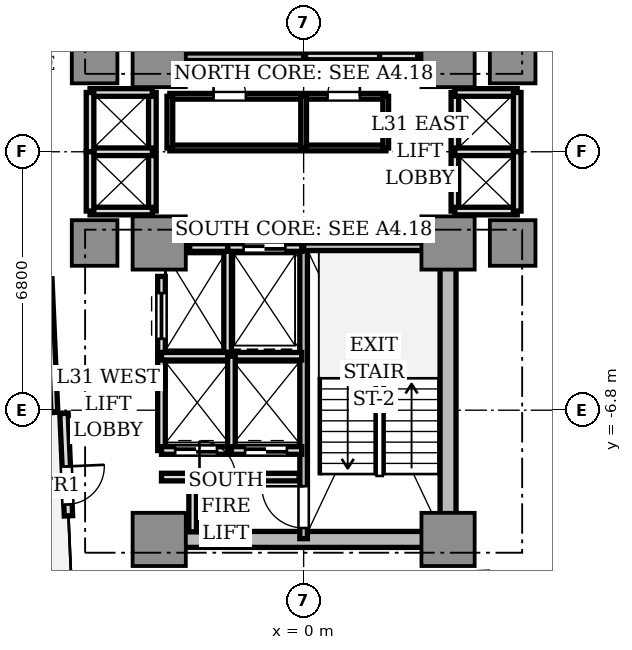
"""IFC4 building model, lengths in metres.
Left out: names, types, materials, properties, quantities, classifications, styles, units other than length and angle.
Written with IfcOpenShell. Run it as: python <this file> out.ifc"""

import sys

from ifc_helpers import new_model, si_unit, direction, frame, frame_2d, origin, origin_2d, place, context, subcontext, project, spatial, rectangle, extrude, source, transform, mapped, element, fill, save


model = new_model("IFC4")
c1 = context("Model", 3, precision=1e-05, world=origin(), true_north=direction((0.0, 1.0)))
c2 = subcontext(c1, "Body", "Model", "MODEL_VIEW")
j1 = project(units=[si_unit("LENGTHUNIT", "METRE"), si_unit("PLANEANGLEUNIT", "RADIAN")], contexts=[c1])
p1 = place(None, origin())
s1 = spatial("IfcSite", under=j1, at=p1, CompositionType="ELEMENT")
p2 = place(p1, origin())
s2 = spatial("IfcBuilding", under=s1, at=p2, CompositionType="ELEMENT")
p3 = place(p2, frame((0.0, 0.0, 114.8)))
s3 = spatial("IfcBuildingStorey", under=s2, at=p3, CompositionType="ELEMENT", Elevation=114.8)
p4 = place(p3, frame((-3.55, -10.2, 0.0), z_axis=(0.0, 0.0, 1.0), x_axis=(1.0, 0.0, 0.0)))
e1 = element("IfcWall", 1, at=p4, inside=s3, PredefinedType="SHEAR", context=c2, shape_type="SweptSolid", body=[
    extrude(rectangle(XDim=7.1, YDim=0.42, at=frame_2d((3.55, 0.0))), origin(), (0.0, 0.0, 1.0), 3.11),
])
p5 = place(p3, frame((3.8, -9.75, 0.0), z_axis=(0.0, 0.0, 1.0), x_axis=(0.0, 1.0, 0.0)))
e2 = element("IfcWall", 2, at=p5, inside=s3, PredefinedType="SHEAR", context=c2, shape_type="SweptSolid", body=[
    extrude(rectangle(XDim=6.9, YDim=0.42, at=frame_2d((3.45, 0.0))), origin(), (0.0, 0.0, 1.0), 3.11),
])
m1 = source(origin(), c2, "Body", "SweptSolid", [
    extrude(rectangle(XDim=1.4, YDim=1.4, at=origin_2d()), origin(), (0.0, 0.0, 1.0), 3.11),
])
for number, where, z_axis, x_axis in (
    (3, (-3.8, 2.4, 0.0), (0.0, 0.0, 1.0), (1.0, 0.0, 0.0)),
    (4, (3.8, 2.4, 0.0), (0.0, 0.0, 1.0), (1.0, 0.0, 0.0)),
    (5, (-3.8, -2.4, 0.0), (0.0, 0.0, 1.0), (1.0, 0.0, 0.0)),
    (6, (3.8, -2.4, 0.0), (0.0, 0.0, 1.0), (1.0, 0.0, 0.0)),
    (7, (-3.8, -10.2, 0.0), (0.0, 0.0, 1.0), (1.0, 0.0, 0.0)),
    (8, (3.8, -10.2, 0.0), (0.0, 0.0, 1.0), (1.0, 0.0, 0.0)),
):
    element("IfcColumn", number, at=place(p3, frame(where, z_axis=z_axis, x_axis=x_axis)), inside=s3, PredefinedType="COLUMN", context=c2, shape_type="MappedRepresentation", body=[
        mapped(m1, transform((0.0, 0.0, 0.0), scale=1.0)),
    ])
m2 = source(origin(), c2, "Body", "SweptSolid", [
    extrude(rectangle(XDim=1.2, YDim=1.2, at=origin_2d()), origin(), (0.0, 0.0, 1.0), 3.11),
])
for number, where, z_axis, x_axis in (
    (9, (5.5, 2.4, 0.0), (0.0, 0.0, 1.0), (1.0, 0.0, 0.0)),
    (10, (-5.5, 2.4, 0.0), (0.0, 0.0, 1.0), (1.0, 0.0, 0.0)),
    (11, (5.5, -2.4, 0.0), (0.0, 0.0, 1.0), (1.0, 0.0, 0.0)),
    (12, (-5.5, -2.4, 0.0), (0.0, 0.0, 1.0), (1.0, 0.0, 0.0)),
):
    element("IfcColumn", number, at=place(p3, frame(where, z_axis=z_axis, x_axis=x_axis)), inside=s3, PredefinedType="COLUMN", context=c2, shape_type="MappedRepresentation", body=[
        mapped(m2, transform((0.0, 0.0, 0.0), scale=1.0)),
    ])
p6 = place(p3, frame((-6.306, -6.882, 0.0), z_axis=(0.0, 0.0, 1.0), x_axis=(0.043672655174, -0.999045894436, 0.0)))
e13 = element("IfcWall", 13, at=p6, inside=s3, PredefinedType="STANDARD", context=c2, shape_type="SweptSolid", body=[
    extrude(rectangle(XDim=2.7, YDim=0.22, at=frame_2d((1.35, 0.0))), origin(), (0.0, 0.0, 1.0), 3.11),
])
p7 = place(p6, frame((1.4, 0.0, 0.0)))
e14 = element("IfcOpeningElement", 14, at=p7, cuts=e13, PredefinedType="OPENING", context=c2, shape_type="SweptSolid", body=[
    extrude(rectangle(XDim=1.0, YDim=2.2, at=frame_2d((0.5, 1.1))), frame((0.0, 0.12, 0.0), z_axis=(0.0, -1.0, 0.0), x_axis=(1.0, 0.0, 0.0)), (0.0, 0.0, 1.0), 0.24),
])
p8 = place(p3, frame((0.0, 2.5, 0.0), z_axis=(0.0, 0.0, 1.0), x_axis=(0.0, 1.0, 0.0)))
e15 = element("IfcWall", 15, at=p8, inside=s3, PredefinedType="SOLIDWALL", context=c2, shape_type="SweptSolid", body=[
    extrude(rectangle(XDim=7.68, YDim=0.2, at=frame_2d((3.84, 0.0))), origin(), (0.0, 0.0, 1.0), 3.11),
])
p9 = place(p8, frame((6.36, 0.0, 0.0)))
e16 = element("IfcOpeningElement", 16, at=p9, cuts=e15, PredefinedType="OPENING", context=c2, shape_type="SweptSolid", body=[
    extrude(rectangle(XDim=1.1, YDim=2.15, at=frame_2d((0.55, 1.075))), frame((0.0, 0.11, 0.0), z_axis=(0.0, -1.0, 0.0), x_axis=(1.0, 0.0, 0.0)), (0.0, 0.0, 1.0), 0.22),
])
p10 = place(p3, frame((-3.72, 2.5, 0.0), z_axis=(0.0, 0.0, 1.0), x_axis=(1.0, 0.0, 0.0)))
e17 = element("IfcWall", 17, at=p10, inside=s3, PredefinedType="SOLIDWALL", context=c2, shape_type="SweptSolid", body=[
    extrude(rectangle(XDim=3.72, YDim=0.2, at=frame_2d((1.86, 0.0))), origin(), (0.0, 0.0, 1.0), 3.11),
])
p11 = place(p3, frame((0.0, -10.18, 0.0), z_axis=(0.0, 0.0, 1.0), x_axis=(0.0, 1.0, 0.0)))
e18 = element("IfcWall", 18, at=p11, inside=s3, PredefinedType="SOLIDWALL", context=c2, shape_type="SweptSolid", body=[
    extrude(rectangle(XDim=7.68, YDim=0.2, at=frame_2d((3.84, 0.0))), origin(), (0.0, 0.0, 1.0), 3.11),
])
p12 = place(p11, frame((0.28, 0.0, 0.0)))
e19 = element("IfcOpeningElement", 19, at=p12, cuts=e18, PredefinedType="OPENING", context=c2, shape_type="SweptSolid", body=[
    extrude(rectangle(XDim=1.1, YDim=2.15, at=frame_2d((0.55, 1.075))), frame((0.0, 0.11, 0.0), z_axis=(0.0, -1.0, 0.0), x_axis=(1.0, 0.0, 0.0)), (0.0, 0.0, 1.0), 0.22),
])
p13 = place(p3, frame((0.0, -2.5, 0.0), z_axis=(0.0, 0.0, 1.0), x_axis=(1.0, 0.0, 0.0)))
e20 = element("IfcWall", 20, at=p13, inside=s3, PredefinedType="SOLIDWALL", context=c2, shape_type="SweptSolid", body=[
    extrude(rectangle(XDim=3.72, YDim=0.2, at=frame_2d((1.86, 0.0))), origin(), (0.0, 0.0, 1.0), 3.11),
])
p14 = place(p3, frame((2.0, 2.5, 0.0), z_axis=(0.0, 0.0, 1.0), x_axis=(0.0, 1.0, 0.0)))
e21 = element("IfcWall", 21, at=p14, inside=s3, PredefinedType="SOLIDWALL", context=c2, shape_type="SweptSolid", body=[
    extrude(rectangle(XDim=2.78, YDim=0.2, at=frame_2d((1.39, 0.0))), origin(), (0.0, 0.0, 1.0), 2.66),
])
p15 = place(p3, frame((0.05, 2.52, 0.0), z_axis=(0.0, 0.0, 1.0), x_axis=(1.0, 0.0, 0.0)))
e22 = element("IfcWall", 22, at=p15, inside=s3, PredefinedType="SOLIDWALL", context=c2, shape_type="SweptSolid", body=[
    extrude(rectangle(XDim=1.95, YDim=0.2, at=frame_2d((0.975, 0.0))), origin(), (0.0, 0.0, 1.0), 2.66),
])
p16 = place(p3, frame((-2.0, -5.28, 0.0), z_axis=(0.0, 0.0, 1.0), x_axis=(0.0, 1.0, 0.0)))
e23 = element("IfcWall", 23, at=p16, inside=s3, PredefinedType="SOLIDWALL", context=c2, shape_type="SweptSolid", body=[
    extrude(rectangle(XDim=2.78, YDim=0.2, at=frame_2d((1.39, 0.0))), origin(), (0.0, 0.0, 1.0), 2.66),
])
p17 = place(p3, frame((-2.0, -2.52, 0.0), z_axis=(0.0, 0.0, 1.0), x_axis=(1.0, 0.0, 0.0)))
e24 = element("IfcWall", 24, at=p17, inside=s3, PredefinedType="SOLIDWALL", context=c2, shape_type="SweptSolid", body=[
    extrude(rectangle(XDim=1.95, YDim=0.2, at=frame_2d((0.975, 0.0))), origin(), (0.0, 0.0, 1.0), 2.66),
])
p18 = place(p17, frame((0.42, 0.0, 0.0)))
e25 = element("IfcOpeningElement", 25, at=p18, cuts=e24, PredefinedType="OPENING", context=c2, shape_type="SweptSolid", body=[
    extrude(rectangle(XDim=1.1, YDim=2.2, at=frame_2d((0.55, 1.1))), frame((0.0, 0.11, 0.0), z_axis=(0.0, -1.0, 0.0), x_axis=(1.0, 0.0, 0.0)), (0.0, 0.0, 1.0), 0.22),
])
for number, where, z_axis, x_axis in (
    (26, (2.0, 2.52, 0.0), (0.0, 0.0, 1.0), (1.0, 0.0, 0.0)),
    (27, (-3.0, -2.52, 0.0), (0.0, 0.0, 1.0), (1.0, 0.0, 0.0)),
):
    element("IfcWall", number, at=place(p3, frame(where, z_axis=z_axis, x_axis=x_axis)), inside=s3, PredefinedType="SOLIDWALL", context=c2, shape_type="SweptSolid", body=[
        extrude(rectangle(XDim=1.0, YDim=0.2, at=frame_2d((0.5, 0.0))), origin(), (0.0, 0.0, 1.0), 2.66),
    ])
p19 = place(p3, frame((-3.74, -5.36, 0.0), z_axis=(0.0, 0.0, 1.0), x_axis=(0.0, 1.0, 0.0)))
e28 = element("IfcWall", 28, at=p19, inside=s3, PredefinedType="SOLIDWALL", context=c2, shape_type="SweptSolid", body=[
    extrude(rectangle(XDim=2.08, YDim=0.2, at=frame_2d((1.04, 0.0))), origin(), (0.0, 0.0, 1.0), 2.66),
])
p20 = place(p19, frame((0.44, 0.0, 0.0)))
e29 = element("IfcOpeningElement", 29, at=p20, cuts=e28, PredefinedType="OPENING", context=c2, shape_type="SweptSolid", body=[
    extrude(rectangle(XDim=1.2, YDim=2.2, at=frame_2d((0.6, 1.1))), frame((0.0, 0.11, 0.0), z_axis=(0.0, -1.0, 0.0), x_axis=(1.0, 0.0, 0.0)), (0.0, 0.0, 1.0), 0.22),
])
p21 = place(p3, frame((-3.74, -7.86, 0.0), z_axis=(0.0, 0.0, 1.0), x_axis=(0.0, 1.0, 0.0)))
e30 = element("IfcWall", 30, at=p21, inside=s3, PredefinedType="SOLIDWALL", context=c2, shape_type="SweptSolid", body=[
    extrude(rectangle(XDim=2.48, YDim=0.2, at=frame_2d((1.24, 0.0))), origin(), (0.0, 0.0, 1.0), 2.66),
])
p22 = place(p3, frame((-3.74, -7.86, 0.0), z_axis=(0.0, 0.0, 1.0), x_axis=(1.0, 0.0, 0.0)))
e31 = element("IfcWall", 31, at=p22, inside=s3, PredefinedType="SOLIDWALL", context=c2, shape_type="SweptSolid", body=[
    extrude(rectangle(XDim=1.84, YDim=0.2, at=frame_2d((0.92, 0.0))), origin(), (0.0, 0.0, 1.0), 2.66),
])
p23 = place(p22, frame((0.36, 0.0, 0.0)))
e32 = element("IfcOpeningElement", 32, at=p23, cuts=e31, PredefinedType="OPENING", context=c2, shape_type="SweptSolid", body=[
    extrude(rectangle(XDim=1.1, YDim=2.2, at=frame_2d((0.55, 1.1))), frame((0.0, 0.11, 0.0), z_axis=(0.0, -1.0, 0.0), x_axis=(1.0, 0.0, 0.0)), (0.0, 0.0, 1.0), 0.22),
])
p24 = place(p3, frame((-3.74, -5.38, 0.0), z_axis=(0.0, 0.0, 1.0), x_axis=(1.0, 0.0, 0.0)))
e33 = element("IfcWall", 33, at=p24, inside=s3, PredefinedType="SOLIDWALL", context=c2, shape_type="SweptSolid", body=[
    extrude(rectangle(XDim=3.69, YDim=0.2, at=frame_2d((1.845, 0.0))), origin(), (0.0, 0.0, 1.0), 2.66),
])
p25 = place(p3, frame((-1.9, -7.86, 0.0), z_axis=(0.0, 0.0, 1.0), x_axis=(0.0, 1.0, 0.0)))
e34 = element("IfcWall", 34, at=p25, inside=s3, PredefinedType="SOLIDWALL", context=c2, shape_type="SweptSolid", body=[
    extrude(rectangle(XDim=2.48, YDim=0.2, at=frame_2d((1.24, 0.0))), origin(), (0.0, 0.0, 1.0), 2.66),
])
p26 = place(p3, frame((-1.9, -7.86, 0.0), z_axis=(0.0, 0.0, 1.0), x_axis=(1.0, 0.0, 0.0)))
e35 = element("IfcWall", 35, at=p26, inside=s3, PredefinedType="SOLIDWALL", context=c2, shape_type="SweptSolid", body=[
    extrude(rectangle(XDim=1.85, YDim=0.2, at=frame_2d((0.925, 0.0))), origin(), (0.0, 0.0, 1.0), 2.66),
])
p27 = place(p26, frame((0.36, 0.0, 0.0)))
e36 = element("IfcOpeningElement", 36, at=p27, cuts=e35, PredefinedType="OPENING", context=c2, shape_type="SweptSolid", body=[
    extrude(rectangle(XDim=1.1, YDim=2.2, at=frame_2d((0.55, 1.1))), frame((0.0, 0.11, 0.0), z_axis=(0.0, -1.0, 0.0), x_axis=(1.0, 0.0, 0.0)), (0.0, 0.0, 1.0), 0.22),
])
p28 = place(p3, frame((3.98, -1.56, 0.0), z_axis=(0.0, 0.0, 1.0), x_axis=(0.0, 1.0, 0.0)))
e37 = element("IfcWall", 37, at=p28, inside=s3, PredefinedType="SOLIDWALL", context=c2, shape_type="SweptSolid", body=[
    extrude(rectangle(XDim=3.12, YDim=0.2, at=frame_2d((1.56, 0.0))), origin(), (0.0, 0.0, 1.0), 2.28),
])
for number, where, z_axis, x_axis in (
    (38, (3.98, 1.56, 0.0), (0.0, 0.0, 1.0), (1.0, 0.0, 0.0)),
    (39, (3.98, -1.56, 0.0), (0.0, 0.0, 1.0), (1.0, 0.0, 0.0)),
    (40, (3.98, 0.0, 0.0), (0.0, 0.0, 1.0), (1.0, 0.0, 0.0)),
):
    element("IfcWall", number, at=place(p3, frame(where, z_axis=z_axis, x_axis=x_axis)), inside=s3, PredefinedType="SOLIDWALL", context=c2, shape_type="SweptSolid", body=[
        extrude(rectangle(XDim=1.64, YDim=0.2, at=frame_2d((0.82, 0.0))), origin(), (0.0, 0.0, 1.0), 2.66),
    ])
for number, where, z_axis, x_axis in (
    (41, (5.62, 0.0, 0.0), (0.0, 0.0, 1.0), (0.0, 1.0, 0.0)),
    (42, (5.62, -1.56, 0.0), (0.0, 0.0, 1.0), (0.0, 1.0, 0.0)),
):
    element("IfcWall", number, at=place(p3, frame(where, z_axis=z_axis, x_axis=x_axis)), inside=s3, PredefinedType="SOLIDWALL", context=c2, shape_type="SweptSolid", body=[
        extrude(rectangle(XDim=1.56, YDim=0.2, at=frame_2d((0.78, 0.0))), origin(), (0.0, 0.0, 1.0), 2.66),
    ])
p29 = place(p3, frame((-3.98, -1.56, 0.0), z_axis=(0.0, 0.0, 1.0), x_axis=(0.0, 1.0, 0.0)))
e43 = element("IfcWall", 43, at=p29, inside=s3, PredefinedType="SOLIDWALL", context=c2, shape_type="SweptSolid", body=[
    extrude(rectangle(XDim=3.12, YDim=0.2, at=frame_2d((1.56, 0.0))), origin(), (0.0, 0.0, 1.0), 2.28),
])
for number, where, z_axis, x_axis in (
    (44, (-5.62, 1.56, 0.0), (0.0, 0.0, 1.0), (1.0, 0.0, 0.0)),
    (45, (-5.62, -1.56, 0.0), (0.0, 0.0, 1.0), (1.0, 0.0, 0.0)),
    (46, (-5.62, 0.0, 0.0), (0.0, 0.0, 1.0), (1.0, 0.0, 0.0)),
):
    element("IfcWall", number, at=place(p3, frame(where, z_axis=z_axis, x_axis=x_axis)), inside=s3, PredefinedType="SOLIDWALL", context=c2, shape_type="SweptSolid", body=[
        extrude(rectangle(XDim=1.64, YDim=0.2, at=frame_2d((0.82, 0.0))), origin(), (0.0, 0.0, 1.0), 2.66),
    ])
for number, where, z_axis, x_axis in (
    (47, (-5.62, 0.0, 0.0), (0.0, 0.0, 1.0), (0.0, 1.0, 0.0)),
    (48, (-5.62, -1.56, 0.0), (0.0, 0.0, 1.0), (0.0, 1.0, 0.0)),
):
    element("IfcWall", number, at=place(p3, frame(where, z_axis=z_axis, x_axis=x_axis)), inside=s3, PredefinedType="SOLIDWALL", context=c2, shape_type="SweptSolid", body=[
        extrude(rectangle(XDim=1.56, YDim=0.2, at=frame_2d((0.78, 0.0))), origin(), (0.0, 0.0, 1.0), 2.66),
    ])
p30 = place(p3, frame((-3.74, -8.56, 0.0), z_axis=(0.0, 0.0, 1.0), x_axis=(1.0, 0.0, 0.0)))
e49 = element("IfcWall", 49, at=p30, inside=s3, PredefinedType="SOLIDWALL", context=c2, shape_type="SweptSolid", body=[
    extrude(rectangle(XDim=3.62, YDim=0.2, at=frame_2d((1.81, 0.0))), origin(), (0.0, 0.0, 1.0), 2.66),
])
p31 = place(p30, frame((1.0, 0.0, 0.0)))
e50 = element("IfcOpeningElement", 50, at=p31, cuts=e49, PredefinedType="OPENING", context=c2, shape_type="SweptSolid", body=[
    extrude(rectangle(XDim=0.95, YDim=2.15, at=frame_2d((0.475, 1.075))), frame((0.0, 0.11, 0.0), z_axis=(0.0, -1.0, 0.0), x_axis=(1.0, 0.0, 0.0)), (0.0, 0.0, 1.0), 0.22),
])
p32 = place(p3, frame((-2.92, -10.0, 0.0), z_axis=(0.0, 0.0, 1.0), x_axis=(0.0, 1.0, 0.0)))
e51 = element("IfcWall", 51, at=p32, inside=s3, PredefinedType="SOLIDWALL", context=c2, shape_type="SweptSolid", body=[
    extrude(rectangle(XDim=1.44, YDim=0.2, at=frame_2d((0.72, 0.0))), origin(), (0.0, 0.0, 1.0), 2.66),
])
p33 = place(p3, frame((-3.52, 0.1, 0.0), z_axis=(0.0, 0.0, 1.0), x_axis=(1.0, 0.0, 0.0)))
e52 = element("IfcWall", 52, at=p33, inside=s3, PredefinedType="PARTITIONING", context=c2, shape_type="SweptSolid", body=[
    extrude(rectangle(XDim=5.68, YDim=0.15, at=frame_2d((2.84, 0.0))), origin(), (0.0, 0.0, 1.0), 2.66),
])
p34 = place(p3, frame((-3.52, 1.46, 0.0), z_axis=(0.0, 0.0, 1.0), x_axis=(1.0, 0.0, 0.0)))
e53 = element("IfcWall", 53, at=p34, inside=s3, PredefinedType="PARTITIONING", context=c2, shape_type="SweptSolid", body=[
    extrude(rectangle(XDim=5.68, YDim=0.15, at=frame_2d((2.84, 0.0))), origin(), (0.0, 0.0, 1.0), 2.66),
])
p35 = place(p34, frame((1.15, 0.0, 0.0)))
e54 = element("IfcOpeningElement", 54, at=p35, cuts=e53, PredefinedType="OPENING", context=c2, shape_type="SweptSolid", body=[
    extrude(rectangle(XDim=0.85, YDim=2.1, at=frame_2d((0.425, 1.05))), frame((0.0, 0.085, 0.0), z_axis=(0.0, -1.0, 0.0), x_axis=(1.0, 0.0, 0.0)), (0.0, 0.0, 1.0), 0.17),
])
p36 = place(p34, frame((4.15, 0.0, 0.0)))
e55 = element("IfcOpeningElement", 55, at=p36, cuts=e53, PredefinedType="OPENING", context=c2, shape_type="SweptSolid", body=[
    extrude(rectangle(XDim=0.85, YDim=2.1, at=frame_2d((0.425, 1.05))), frame((0.0, 0.085, 0.0), z_axis=(0.0, -1.0, 0.0), x_axis=(1.0, 0.0, 0.0)), (0.0, 0.0, 1.0), 0.17),
])
p37 = place(p3, frame((-3.52, 0.1, 0.0), z_axis=(0.0, 0.0, 1.0), x_axis=(0.0, 1.0, 0.0)))
e56 = element("IfcWall", 56, at=p37, inside=s3, PredefinedType="PARTITIONING", context=c2, shape_type="SweptSolid", body=[
    extrude(rectangle(XDim=1.36, YDim=0.15, at=frame_2d((0.68, 0.0))), origin(), (0.0, 0.0, 1.0), 2.28),
])
for number, where, z_axis, x_axis in (
    (57, (2.16, 0.1, 0.0), (0.0, 0.0, 1.0), (0.0, 1.0, 0.0)),
    (58, (0.0, 0.1, 0.0), (0.0, 0.0, 1.0), (0.0, 1.0, 0.0)),
):
    element("IfcWall", number, at=place(p3, frame(where, z_axis=z_axis, x_axis=x_axis)), inside=s3, PredefinedType="PARTITIONING", context=c2, shape_type="SweptSolid", body=[
        extrude(rectangle(XDim=1.36, YDim=0.15, at=frame_2d((0.68, 0.0))), origin(), (0.0, 0.0, 1.0), 2.66),
    ])
p38 = place(p3, frame((-6.71, -3.346, 0.0), z_axis=(0.0, 0.0, 1.0), x_axis=(0.043597663116, -0.999049169846, 0.0)))
e59 = element("IfcWall", 59, at=p38, inside=s3, PredefinedType="PARTITIONING", context=c2, shape_type="SweptSolid", body=[
    extrude(rectangle(XDim=3.5, YDim=0.18, at=frame_2d((1.75, 0.0))), origin(), (0.0, 0.0, 1.0), 2.66),
])
m3 = source(origin(), c2, "Body", "SweptSolid", [
    extrude(rectangle(XDim=1.0, YDim=0.05, at=origin_2d()), origin(), (0.0, 0.0, 1.0), 2.2),
])
p39 = place(p7, frame((0.5, 0.0, 0.0)))
e60 = element("IfcDoor", 60, at=p39, inside=s3, OperationType="SINGLE_SWING_LEFT", PredefinedType="DOOR", context=c2, shape_type="MappedRepresentation", body=[
    mapped(m3, transform((0.0, 0.0, 0.0), scale=1.0)),
])
fill(e14, e60)
m4 = source(origin(), c2, "Body", "SweptSolid", [
    extrude(rectangle(XDim=1.1, YDim=0.05, at=origin_2d()), origin(), (0.0, 0.0, 1.0), 2.2),
])
p40 = place(p18, frame((0.55, 0.0, 0.0)))
e61 = element("IfcDoor", 61, at=p40, inside=s3, OperationType="DOUBLE_DOOR_SLIDING", PredefinedType="DOOR", context=c2, shape_type="MappedRepresentation", body=[
    mapped(m4, transform((0.0, 0.0, 0.0), scale=1.0)),
])
fill(e25, e61)
m5 = source(origin(), c2, "Body", "SweptSolid", [
    extrude(rectangle(XDim=1.2, YDim=0.05, at=origin_2d()), origin(), (0.0, 0.0, 1.0), 2.2),
])
p41 = place(p20, frame((0.6, 0.0, 0.0)))
e62 = element("IfcDoor", 62, at=p41, inside=s3, OperationType="DOUBLE_DOOR_SLIDING", PredefinedType="DOOR", context=c2, shape_type="MappedRepresentation", body=[
    mapped(m5, transform((0.0, 0.0, 0.0), scale=1.0)),
])
fill(e29, e62)
p42 = place(p23, frame((0.55, 0.0, 0.0)))
e63 = element("IfcDoor", 63, at=p42, inside=s3, OperationType="DOUBLE_DOOR_SLIDING", PredefinedType="DOOR", context=c2, shape_type="MappedRepresentation", body=[
    mapped(m4, transform((0.0, 0.0, 0.0), scale=1.0)),
])
fill(e32, e63)
p43 = place(p27, frame((0.55, 0.0, 0.0)))
e64 = element("IfcDoor", 64, at=p43, inside=s3, OperationType="DOUBLE_DOOR_SLIDING", PredefinedType="DOOR", context=c2, shape_type="MappedRepresentation", body=[
    mapped(m4, transform((0.0, 0.0, 0.0), scale=1.0)),
])
fill(e36, e64)
m6 = source(origin(), c2, "Body", "SweptSolid", [
    extrude(rectangle(XDim=1.1, YDim=0.05, at=origin_2d()), origin(), (0.0, 0.0, 1.0), 2.15),
])
p44 = place(p12, frame((0.55, 0.0, 0.0)))
e65 = element("IfcDoor", 65, at=p44, inside=s3, OperationType="SINGLE_SWING_RIGHT", PredefinedType="DOOR", context=c2, shape_type="MappedRepresentation", body=[
    mapped(m6, transform((0.0, 0.0, 0.0), scale=1.0)),
])
fill(e19, e65)
m7 = source(origin(), c2, "Body", "SweptSolid", [
    extrude(rectangle(XDim=0.95, YDim=0.05, at=origin_2d()), origin(), (0.0, 0.0, 1.0), 2.15),
])
p45 = place(p31, frame((0.475, 0.0, 0.0)))
e66 = element("IfcDoor", 66, at=p45, inside=s3, OperationType="SINGLE_SWING_LEFT", PredefinedType="DOOR", context=c2, shape_type="MappedRepresentation", body=[
    mapped(m7, transform((0.0, 0.0, 0.0), scale=1.0)),
])
fill(e50, e66)
m8 = source(origin(), c2, "Body", "SweptSolid", [
    extrude(rectangle(XDim=0.85, YDim=0.05, at=origin_2d()), origin(), (0.0, 0.0, 1.0), 2.1),
])
p46 = place(p35, frame((0.425, 0.0, 0.0)))
e67 = element("IfcDoor", 67, at=p46, inside=s3, OperationType="SINGLE_SWING_LEFT", PredefinedType="DOOR", context=c2, shape_type="MappedRepresentation", body=[
    mapped(m8, transform((0.0, 0.0, 0.0), scale=1.0)),
])
fill(e54, e67)
p47 = place(p36, frame((0.425, 0.0, 0.0)))
e68 = element("IfcDoor", 68, at=p47, inside=s3, OperationType="SINGLE_SWING_RIGHT", PredefinedType="DOOR", context=c2, shape_type="MappedRepresentation", body=[
    mapped(m8, transform((0.0, 0.0, 0.0), scale=1.0)),
])
fill(e55, e68)
save(model, sys.argv[1])
